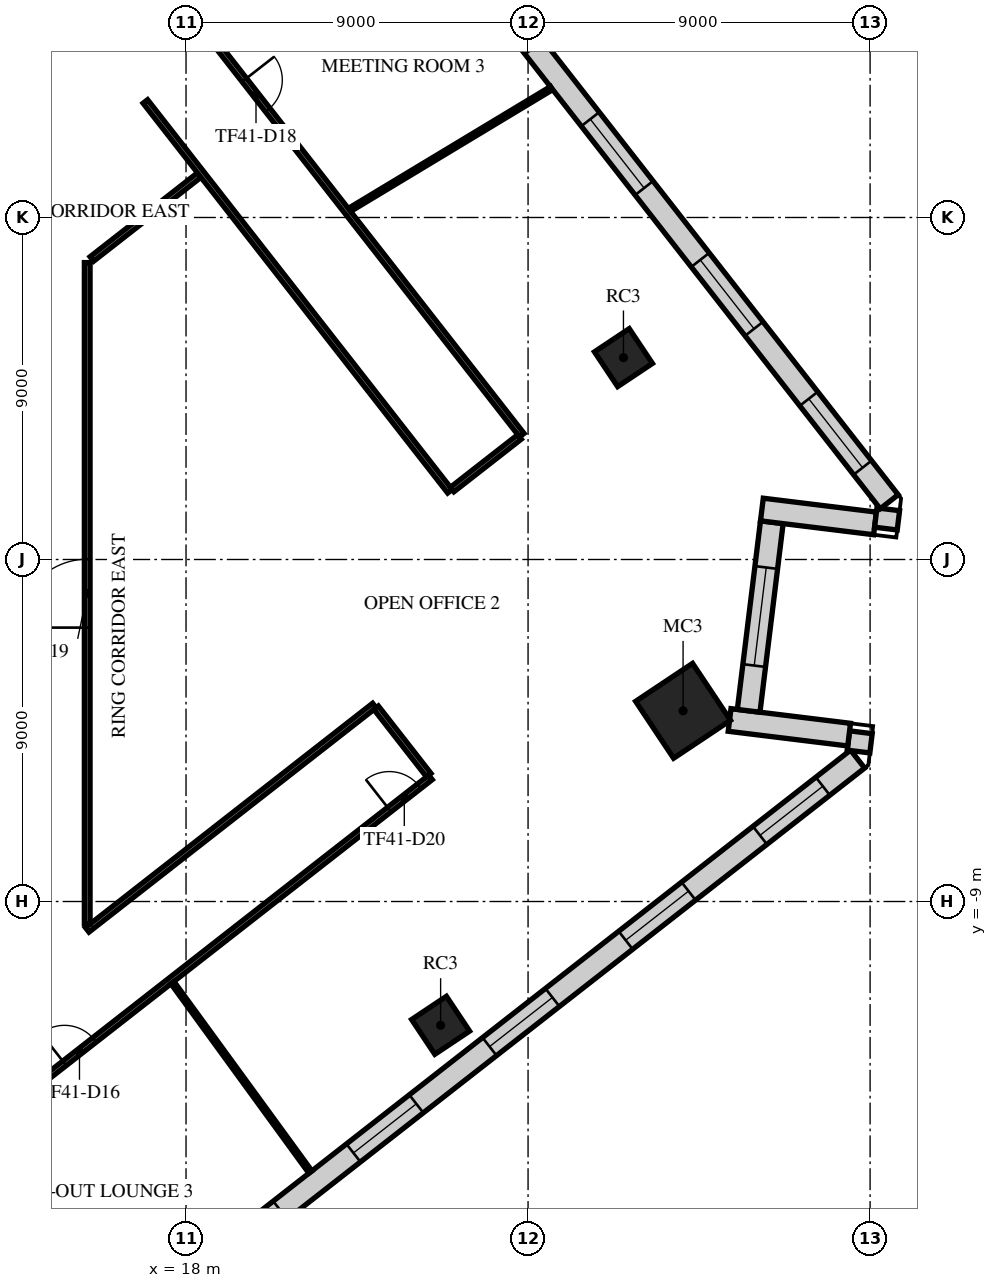
"""IFC4 building model, lengths in metres.
Left out: names, types, materials, properties, quantities, classifications, styles, units other than length and angle.
Written with IfcOpenShell. Run it as: python <this file> out.ifc"""

import sys

from ifc_helpers import new_model, si_unit, direction, frame, frame_2d, origin, origin_2d, place, context, subcontext, project, spatial, rectangle, extrude, element, fill, save


model = new_model("IFC4")
c1 = context("Model", 3, precision=1e-05, world=origin(), true_north=direction((0.0, 1.0)))
c2 = subcontext(c1, "Body", "Model", "MODEL_VIEW")
j1 = project(units=[si_unit("LENGTHUNIT", "METRE"), si_unit("PLANEANGLEUNIT", "RADIAN")], contexts=[c1])
p1 = place(None, origin())
s1 = spatial("IfcSite", under=j1, at=p1, CompositionType="ELEMENT")
p2 = place(p1, origin())
s2 = spatial("IfcBuilding", under=s1, at=p2, CompositionType="ELEMENT")
p3 = place(p2, frame((0.0, 0.0, 175.7)))
s3 = spatial("IfcBuildingStorey", under=s2, at=p3, CompositionType="ELEMENT", Elevation=175.7)
p4 = place(p3, frame((24.699, -12.258, 0.0), z_axis=(0.0, 0.0, 1.0), x_axis=(0.832028680356, 0.55473261583, 0.0)))
e1 = element("IfcColumn", 1, at=p4, inside=s3, PredefinedType="COLUMN", context=c2, shape_type="SweptSolid", body=[
    extrude(rectangle(XDim=1.1, YDim=1.1, at=origin_2d()), origin(), (0.0, 0.0, 1.0), 4.0),
])
p5 = place(p3, frame((31.079, -3.982, 0.0), z_axis=(0.0, 0.0, 1.0), x_axis=(0.832028680356, 0.55473261583, 0.0)))
e2 = element("IfcColumn", 2, at=p5, inside=s3, PredefinedType="COLUMN", context=c2, shape_type="SweptSolid", body=[
    extrude(rectangle(XDim=1.8, YDim=1.8, at=origin_2d()), origin(), (0.0, 0.0, 1.0), 4.0),
])
p6 = place(p3, frame((29.51, 5.312, 0.0), z_axis=(0.0, 0.0, 1.0), x_axis=(0.832028680356, 0.55473261583, 0.0)))
e3 = element("IfcColumn", 3, at=p6, inside=s3, PredefinedType="COLUMN", context=c2, shape_type="SweptSolid", body=[
    extrude(rectangle(XDim=1.1, YDim=1.1, at=origin_2d()), origin(), (0.0, 0.0, 1.0), 4.0),
])
p7 = place(p3, frame((-3.534, -35.882, 0.0), z_axis=(0.0, 0.0, 1.0), x_axis=(0.788011205374, 0.61566089709, 0.0)))
e4 = element("IfcWall", 4, at=p7, inside=s3, PredefinedType="STANDARD", context=c2, shape_type="SweptSolid", body=[
    extrude(rectangle(XDim=49.752, YDim=0.6, at=frame_2d((24.876, 0.0))), origin(), (0.0, 0.0, 1.0), 3.6),
])
p8 = place(p7, frame((1.161, 0.0, 0.9)))
e5 = element("IfcOpeningElement", 5, at=p8, cuts=e4, PredefinedType="OPENING", context=c2, shape_type="SweptSolid", body=[
    extrude(rectangle(XDim=2.1, YDim=2.1, at=frame_2d((1.05, 1.05))), frame((0.0, 0.31, 0.0), z_axis=(0.0, -1.0, 0.0), x_axis=(1.0, 0.0, 0.0)), (0.0, 0.0, 1.0), 0.62),
])
p9 = place(p7, frame((5.644, 0.0, 0.9)))
e6 = element("IfcOpeningElement", 6, at=p9, cuts=e4, PredefinedType="OPENING", context=c2, shape_type="SweptSolid", body=[
    extrude(rectangle(XDim=2.1, YDim=2.1, at=frame_2d((1.05, 1.05))), frame((0.0, 0.31, 0.0), z_axis=(0.0, -1.0, 0.0), x_axis=(1.0, 0.0, 0.0)), (0.0, 0.0, 1.0), 0.62),
])
p10 = place(p7, frame((10.189, 0.0, 0.9)))
e7 = element("IfcOpeningElement", 7, at=p10, cuts=e4, PredefinedType="OPENING", context=c2, shape_type="SweptSolid", body=[
    extrude(rectangle(XDim=2.1, YDim=2.1, at=frame_2d((1.05, 1.05))), frame((0.0, 0.31, 0.0), z_axis=(0.0, -1.0, 0.0), x_axis=(1.0, 0.0, 0.0)), (0.0, 0.0, 1.0), 0.62),
])
p11 = place(p7, frame((14.735, 0.0, 0.9)))
e8 = element("IfcOpeningElement", 8, at=p11, cuts=e4, PredefinedType="OPENING", context=c2, shape_type="SweptSolid", body=[
    extrude(rectangle(XDim=2.1, YDim=2.1, at=frame_2d((1.05, 1.05))), frame((0.0, 0.31, 0.0), z_axis=(0.0, -1.0, 0.0), x_axis=(1.0, 0.0, 0.0)), (0.0, 0.0, 1.0), 0.62),
])
p12 = place(p7, frame((19.28, 0.0, 0.9)))
e9 = element("IfcOpeningElement", 9, at=p12, cuts=e4, PredefinedType="OPENING", context=c2, shape_type="SweptSolid", body=[
    extrude(rectangle(XDim=2.1, YDim=2.1, at=frame_2d((1.05, 1.05))), frame((0.0, 0.31, 0.0), z_axis=(0.0, -1.0, 0.0), x_axis=(1.0, 0.0, 0.0)), (0.0, 0.0, 1.0), 0.62),
])
p13 = place(p7, frame((23.826, 0.0, 0.9)))
e10 = element("IfcOpeningElement", 10, at=p13, cuts=e4, PredefinedType="OPENING", context=c2, shape_type="SweptSolid", body=[
    extrude(rectangle(XDim=2.1, YDim=2.1, at=frame_2d((1.05, 1.05))), frame((0.0, 0.31, 0.0), z_axis=(0.0, -1.0, 0.0), x_axis=(1.0, 0.0, 0.0)), (0.0, 0.0, 1.0), 0.62),
])
p14 = place(p7, frame((28.371, 0.0, 0.9)))
e11 = element("IfcOpeningElement", 11, at=p14, cuts=e4, PredefinedType="OPENING", context=c2, shape_type="SweptSolid", body=[
    extrude(rectangle(XDim=2.1, YDim=2.1, at=frame_2d((1.05, 1.05))), frame((0.0, 0.31, 0.0), z_axis=(0.0, -1.0, 0.0), x_axis=(1.0, 0.0, 0.0)), (0.0, 0.0, 1.0), 0.62),
])
p15 = place(p7, frame((32.917, 0.0, 0.9)))
e12 = element("IfcOpeningElement", 12, at=p15, cuts=e4, PredefinedType="OPENING", context=c2, shape_type="SweptSolid", body=[
    extrude(rectangle(XDim=2.1, YDim=2.1, at=frame_2d((1.05, 1.05))), frame((0.0, 0.31, 0.0), z_axis=(0.0, -1.0, 0.0), x_axis=(1.0, 0.0, 0.0)), (0.0, 0.0, 1.0), 0.62),
])
p16 = place(p7, frame((37.462, 0.0, 0.9)))
e13 = element("IfcOpeningElement", 13, at=p16, cuts=e4, PredefinedType="OPENING", context=c2, shape_type="SweptSolid", body=[
    extrude(rectangle(XDim=2.1, YDim=2.1, at=frame_2d((1.05, 1.05))), frame((0.0, 0.31, 0.0), z_axis=(0.0, -1.0, 0.0), x_axis=(1.0, 0.0, 0.0)), (0.0, 0.0, 1.0), 0.62),
])
p17 = place(p7, frame((42.008, 0.0, 0.9)))
e14 = element("IfcOpeningElement", 14, at=p17, cuts=e4, PredefinedType="OPENING", context=c2, shape_type="SweptSolid", body=[
    extrude(rectangle(XDim=2.1, YDim=2.1, at=frame_2d((1.05, 1.05))), frame((0.0, 0.31, 0.0), z_axis=(0.0, -1.0, 0.0), x_axis=(1.0, 0.0, 0.0)), (0.0, 0.0, 1.0), 0.62),
])
p18 = place(p7, frame((46.491, 0.0, 0.9)))
e15 = element("IfcOpeningElement", 15, at=p18, cuts=e4, PredefinedType="OPENING", context=c2, shape_type="SweptSolid", body=[
    extrude(rectangle(XDim=2.1, YDim=2.1, at=frame_2d((1.05, 1.05))), frame((0.0, 0.31, 0.0), z_axis=(0.0, -1.0, 0.0), x_axis=(1.0, 0.0, 0.0)), (0.0, 0.0, 1.0), 0.62),
])
p19 = place(p3, frame((35.696, -5.053, 0.0), z_axis=(0.0, 0.0, 1.0), x_axis=(0.121800492671, 0.992554603024, 0.0)))
e16 = element("IfcWall", 16, at=p19, inside=s3, PredefinedType="STANDARD", context=c2, shape_type="SweptSolid", body=[
    extrude(rectangle(XDim=0.511, YDim=0.6, at=frame_2d((0.256, 0.0))), origin(), (0.0, 0.0, 1.0), 3.6),
])
p20 = place(p3, frame((35.448, -4.609, 0.0), z_axis=(0.0, 0.0, 1.0), x_axis=(-0.992542310393, 0.12190062379, 0.0)))
e17 = element("IfcWall", 17, at=p20, inside=s3, PredefinedType="STANDARD", context=c2, shape_type="SweptSolid", body=[
    extrude(rectangle(XDim=3.168, YDim=0.6, at=frame_2d((1.584, 0.0))), origin(), (0.0, 0.0, 1.0), 3.6),
])
p21 = place(p3, frame((32.804, -3.982, 0.0), z_axis=(0.0, 0.0, 1.0), x_axis=(0.121876954874, 0.992545217041, 0.0)))
e18 = element("IfcWall", 18, at=p21, inside=s3, PredefinedType="STANDARD", context=c2, shape_type="SweptSolid", body=[
    extrude(rectangle(XDim=5.0, YDim=0.6, at=frame_2d((2.5, 0.0))), origin(), (0.0, 0.0, 1.0), 3.6),
])
p22 = place(p21, frame((1.2, 0.0, 0.9)))
e19 = element("IfcOpeningElement", 19, at=p22, cuts=e18, PredefinedType="OPENING", context=c2, shape_type="SweptSolid", body=[
    extrude(rectangle(XDim=2.6, YDim=2.1, at=frame_2d((1.3, 1.05))), frame((0.0, 0.31, 0.0), z_axis=(0.0, -1.0, 0.0), x_axis=(1.0, 0.0, 0.0)), (0.0, 0.0, 1.0), 0.62),
])
p23 = place(p3, frame((33.153, 1.315, 0.0), z_axis=(0.0, 0.0, 1.0), x_axis=(0.992542246186, -0.121901146576, 0.0)))
e20 = element("IfcWall", 20, at=p23, inside=s3, PredefinedType="STANDARD", context=c2, shape_type="SweptSolid", body=[
    extrude(rectangle(XDim=3.0, YDim=0.6, at=frame_2d((1.5, 0.0))), origin(), (0.0, 0.0, 1.0), 3.6),
])
p24 = place(p3, frame((36.416, 0.814, 0.0), z_axis=(0.0, 0.0, 1.0), x_axis=(0.121800492671, 0.992554603024, 0.0)))
e21 = element("IfcWall", 21, at=p24, inside=s3, PredefinedType="STANDARD", context=c2, shape_type="SweptSolid", body=[
    extrude(rectangle(XDim=0.511, YDim=0.6, at=frame_2d((0.256, 0.0))), origin(), (0.0, 0.0, 1.0), 3.6),
])
p25 = place(p3, frame((36.503, 1.52, 0.0), z_axis=(0.0, 0.0, 1.0), x_axis=(-0.615660779349, 0.788011297363, 0.0)))
e22 = element("IfcWall", 22, at=p25, inside=s3, PredefinedType="STANDARD", context=c2, shape_type="SweptSolid", body=[
    extrude(rectangle(XDim=42.176, YDim=0.6, at=frame_2d((21.088, 0.0))), origin(), (0.0, 0.0, 1.0), 3.6),
])
p26 = place(p25, frame((1.138, 0.0, 0.9)))
e23 = element("IfcOpeningElement", 23, at=p26, cuts=e22, PredefinedType="OPENING", context=c2, shape_type="SweptSolid", body=[
    extrude(rectangle(XDim=2.3, YDim=2.1, at=frame_2d((1.15, 1.05))), frame((0.0, 0.31, 0.0), z_axis=(0.0, -1.0, 0.0), x_axis=(1.0, 0.0, 0.0)), (0.0, 0.0, 1.0), 0.62),
])
p27 = place(p25, frame((5.776, 0.0, 0.9)))
e24 = element("IfcOpeningElement", 24, at=p27, cuts=e22, PredefinedType="OPENING", context=c2, shape_type="SweptSolid", body=[
    extrude(rectangle(XDim=2.3, YDim=2.1, at=frame_2d((1.15, 1.05))), frame((0.0, 0.31, 0.0), z_axis=(0.0, -1.0, 0.0), x_axis=(1.0, 0.0, 0.0)), (0.0, 0.0, 1.0), 0.62),
])
p28 = place(p25, frame((10.476, 0.0, 0.9)))
e25 = element("IfcOpeningElement", 25, at=p28, cuts=e22, PredefinedType="OPENING", context=c2, shape_type="SweptSolid", body=[
    extrude(rectangle(XDim=2.3, YDim=2.1, at=frame_2d((1.15, 1.05))), frame((0.0, 0.31, 0.0), z_axis=(0.0, -1.0, 0.0), x_axis=(1.0, 0.0, 0.0)), (0.0, 0.0, 1.0), 0.62),
])
p29 = place(p25, frame((15.176, 0.0, 0.9)))
e26 = element("IfcOpeningElement", 26, at=p29, cuts=e22, PredefinedType="OPENING", context=c2, shape_type="SweptSolid", body=[
    extrude(rectangle(XDim=2.3, YDim=2.1, at=frame_2d((1.15, 1.05))), frame((0.0, 0.31, 0.0), z_axis=(0.0, -1.0, 0.0), x_axis=(1.0, 0.0, 0.0)), (0.0, 0.0, 1.0), 0.62),
])
p30 = place(p25, frame((19.876, 0.0, 0.9)))
e27 = element("IfcOpeningElement", 27, at=p30, cuts=e22, PredefinedType="OPENING", context=c2, shape_type="SweptSolid", body=[
    extrude(rectangle(XDim=2.3, YDim=2.1, at=frame_2d((1.15, 1.05))), frame((0.0, 0.31, 0.0), z_axis=(0.0, -1.0, 0.0), x_axis=(1.0, 0.0, 0.0)), (0.0, 0.0, 1.0), 0.62),
])
p31 = place(p25, frame((24.576, 0.0, 0.9)))
e28 = element("IfcOpeningElement", 28, at=p31, cuts=e22, PredefinedType="OPENING", context=c2, shape_type="SweptSolid", body=[
    extrude(rectangle(XDim=2.3, YDim=2.1, at=frame_2d((1.15, 1.05))), frame((0.0, 0.31, 0.0), z_axis=(0.0, -1.0, 0.0), x_axis=(1.0, 0.0, 0.0)), (0.0, 0.0, 1.0), 0.62),
])
p32 = place(p25, frame((33.976, 0.0, 0.9)))
e29 = element("IfcOpeningElement", 29, at=p32, cuts=e22, PredefinedType="OPENING", context=c2, shape_type="SweptSolid", body=[
    extrude(rectangle(XDim=2.3, YDim=2.1, at=frame_2d((1.15, 1.05))), frame((0.0, 0.31, 0.0), z_axis=(0.0, -1.0, 0.0), x_axis=(1.0, 0.0, 0.0)), (0.0, 0.0, 1.0), 0.62),
])
p33 = place(p25, frame((38.676, 0.0, 0.9)))
e30 = element("IfcOpeningElement", 30, at=p33, cuts=e22, PredefinedType="OPENING", context=c2, shape_type="SweptSolid", body=[
    extrude(rectangle(XDim=2.3, YDim=2.1, at=frame_2d((1.15, 1.05))), frame((0.0, 0.31, 0.0), z_axis=(0.0, -1.0, 0.0), x_axis=(1.0, 0.0, 0.0)), (0.0, 0.0, 1.0), 0.62),
])
p34 = place(p3, frame((-0.348, -25.095, 0.0), z_axis=(0.0, 0.0, 1.0), x_axis=(0.788010131951, 0.615662271008, 0.0)))
e31 = element("IfcWall", 31, at=p34, inside=s3, PredefinedType="PARTITIONING", context=c2, shape_type="SweptSolid", body=[
    extrude(rectangle(XDim=31.448, YDim=0.15, at=frame_2d((15.724, 0.0))), origin(), (0.0, 0.0, 1.0), 3.15),
])
p35 = place(p34, frame((4.801, 0.0, 0.0)))
e32 = element("IfcOpeningElement", 32, at=p35, cuts=e31, PredefinedType="OPENING", context=c2, shape_type="SweptSolid", body=[
    extrude(rectangle(XDim=1.8, YDim=2.1, at=frame_2d((0.9, 1.05))), frame((0.0, 0.085, 0.0), z_axis=(0.0, -1.0, 0.0), x_axis=(1.0, 0.0, 0.0)), (0.0, 0.0, 1.0), 0.17),
])
p36 = place(p34, frame((0.301, 0.0, 0.0)))
e33 = element("IfcOpeningElement", 33, at=p36, cuts=e31, PredefinedType="OPENING", context=c2, shape_type="SweptSolid", body=[
    extrude(rectangle(XDim=1.0, YDim=2.1, at=frame_2d((0.5, 1.05))), frame((0.0, 0.085, 0.0), z_axis=(0.0, -1.0, 0.0), x_axis=(1.0, 0.0, 0.0)), (0.0, 0.0, 1.0), 0.17),
])
p37 = place(p34, frame((19.226, 0.0, 0.0)))
e34 = element("IfcOpeningElement", 34, at=p37, cuts=e31, PredefinedType="OPENING", context=c2, shape_type="SweptSolid", body=[
    extrude(rectangle(XDim=1.0, YDim=2.1, at=frame_2d((0.5, 1.05))), frame((0.0, 0.085, 0.0), z_axis=(0.0, -1.0, 0.0), x_axis=(1.0, 0.0, 0.0)), (0.0, 0.0, 1.0), 0.17),
])
p38 = place(p34, frame((30.072, 0.0, 0.0)))
e35 = element("IfcOpeningElement", 35, at=p38, cuts=e31, PredefinedType="OPENING", context=c2, shape_type="SweptSolid", body=[
    extrude(rectangle(XDim=1.0, YDim=2.1, at=frame_2d((0.5, 1.05))), frame((0.0, 0.085, 0.0), z_axis=(0.0, -1.0, 0.0), x_axis=(1.0, 0.0, 0.0)), (0.0, 0.0, 1.0), 0.17),
])
p39 = place(p3, frame((9.713, 25.187, 0.0), z_axis=(0.0, 0.0, 1.0), x_axis=(0.615659714696, -0.788012129158, 0.0)))
e36 = element("IfcWall", 36, at=p39, inside=s3, PredefinedType="PARTITIONING", context=c2, shape_type="SweptSolid", body=[
    extrude(rectangle(XDim=27.811, YDim=0.15, at=frame_2d((13.905, 0.0))), origin(), (0.0, 0.0, 1.0), 3.15),
])
p40 = place(p39, frame((8.299, 0.0, 0.0)))
e37 = element("IfcOpeningElement", 37, at=p40, cuts=e36, PredefinedType="OPENING", context=c2, shape_type="SweptSolid", body=[
    extrude(rectangle(XDim=1.0, YDim=2.1, at=frame_2d((0.5, 1.05))), frame((0.0, 0.085, 0.0), z_axis=(0.0, -1.0, 0.0), x_axis=(1.0, 0.0, 0.0)), (0.0, 0.0, 1.0), 0.17),
])
p41 = place(p39, frame((15.951, 0.0, 0.0)))
e38 = element("IfcOpeningElement", 38, at=p41, cuts=e36, PredefinedType="OPENING", context=c2, shape_type="SweptSolid", body=[
    extrude(rectangle(XDim=1.0, YDim=2.1, at=frame_2d((0.5, 1.05))), frame((0.0, 0.085, 0.0), z_axis=(0.0, -1.0, 0.0), x_axis=(1.0, 0.0, 0.0)), (0.0, 0.0, 1.0), 0.17),
])
p42 = place(p3, frame((15.4, -9.746, 0.0), z_axis=(0.0, 0.0, 1.0), x_axis=(0.787983457068, 0.615696411705, 0.0)))
e39 = element("IfcWall", 39, at=p42, inside=s3, PredefinedType="PARTITIONING", context=c2, shape_type="SweptSolid", body=[
    extrude(rectangle(XDim=9.589, YDim=0.15, at=frame_2d((4.794, 0.0))), origin(), (0.0, 0.0, 1.0), 3.15),
])
p43 = place(p3, frame((15.4, -9.592, 0.0), z_axis=(0.0, 0.0, 1.0), x_axis=(0.0, 1.0, 0.0)))
e40 = element("IfcWall", 40, at=p43, inside=s3, PredefinedType="PARTITIONING", context=c2, shape_type="SweptSolid", body=[
    extrude(rectangle(XDim=17.405, YDim=0.15, at=frame_2d((8.703, 0.0))), origin(), (0.0, 0.0, 1.0), 3.15),
])
p44 = place(p43, frame((7.8, 0.0, 0.0)))
e41 = element("IfcOpeningElement", 41, at=p44, cuts=e40, PredefinedType="OPENING", context=c2, shape_type="SweptSolid", body=[
    extrude(rectangle(XDim=1.8, YDim=2.1, at=frame_2d((0.9, 1.05))), frame((0.0, 0.085, 0.0), z_axis=(0.0, -1.0, 0.0), x_axis=(1.0, 0.0, 0.0)), (0.0, 0.0, 1.0), 0.17),
])
p45 = place(p3, frame((15.521, 7.908, 0.0), z_axis=(0.0, 0.0, 1.0), x_axis=(0.787935399888, 0.615757911524, 0.0)))
e42 = element("IfcWall", 42, at=p45, inside=s3, PredefinedType="PARTITIONING", context=c2, shape_type="SweptSolid", body=[
    extrude(rectangle(XDim=3.661, YDim=0.15, at=frame_2d((1.831, 0.0))), origin(), (0.0, 0.0, 1.0), 3.15),
])
p46 = place(p3, frame((16.929, 12.053, 0.0), z_axis=(0.0, 0.0, 1.0), x_axis=(0.615693171882, -0.787985988516, 0.0)))
e43 = element("IfcWall", 43, at=p46, inside=s3, PredefinedType="PARTITIONING", context=c2, shape_type="SweptSolid", body=[
    extrude(rectangle(XDim=13.018, YDim=0.15, at=frame_2d((6.509, 0.0))), origin(), (0.0, 0.0, 1.0), 3.15),
])
p47 = place(p3, frame((23.002, -3.901, 0.0), z_axis=(0.0, 0.0, 1.0), x_axis=(0.615321836597, -0.788275990632, 0.0)))
e44 = element("IfcWall", 44, at=p47, inside=s3, PredefinedType="PARTITIONING", context=c2, shape_type="SweptSolid", body=[
    extrude(rectangle(XDim=2.25, YDim=0.15, at=frame_2d((1.125, 0.0))), origin(), (0.0, 0.0, 1.0), 3.15),
])
p48 = place(p3, frame((25.003, 1.841, 0.0), z_axis=(0.0, 0.0, 1.0), x_axis=(0.788111579875, 0.6155324018, 0.0)))
e45 = element("IfcWall", 45, at=p48, inside=s3, PredefinedType="PARTITIONING", context=c2, shape_type="SweptSolid", body=[
    extrude(rectangle(XDim=2.249, YDim=0.15, at=frame_2d((1.125, 0.0))), origin(), (0.0, 0.0, 1.0), 3.6),
])
p49 = place(p3, frame((17.643, -11.136, 0.0), z_axis=(0.0, 0.0, 1.0), x_axis=(0.588621430422, -0.808408814677, 0.0)))
e46 = element("IfcWall", 46, at=p49, inside=s3, PredefinedType="PARTITIONING", context=c2, shape_type="SweptSolid", body=[
    extrude(rectangle(XDim=6.164, YDim=0.1, at=frame_2d((3.082, 0.0))), origin(), (0.0, 0.0, 1.0), 2.9),
])
p50 = place(p3, frame((22.305, 9.202, 0.0), z_axis=(0.0, 0.0, 1.0), x_axis=(0.856511778294, 0.516127478095, 0.0)))
e47 = element("IfcWall", 47, at=p50, inside=s3, PredefinedType="PARTITIONING", context=c2, shape_type="SweptSolid", body=[
    extrude(rectangle(XDim=6.201, YDim=0.1, at=frame_2d((3.101, 0.0))), origin(), (0.0, 0.0, 1.0), 2.9),
])
p51 = place(p15, origin())
e48 = element("IfcWindow", 48, at=p51, inside=s3, PartitioningType="SINGLE_PANEL", PredefinedType="WINDOW", context=c2, shape_type="SweptSolid", body=[
    extrude(rectangle(XDim=2.1, YDim=2.1, at=frame_2d((1.05, 1.05))), frame((0.0, 0.03, 0.0), z_axis=(0.0, -1.0, 0.0), x_axis=(1.0, 0.0, 0.0)), (0.0, 0.0, 1.0), 0.06),
])
fill(e12, e48)
p52 = place(p16, origin())
e49 = element("IfcWindow", 49, at=p52, inside=s3, PartitioningType="SINGLE_PANEL", PredefinedType="WINDOW", context=c2, shape_type="SweptSolid", body=[
    extrude(rectangle(XDim=2.1, YDim=2.1, at=frame_2d((1.05, 1.05))), frame((0.0, 0.03, 0.0), z_axis=(0.0, -1.0, 0.0), x_axis=(1.0, 0.0, 0.0)), (0.0, 0.0, 1.0), 0.06),
])
fill(e13, e49)
p53 = place(p17, origin())
e50 = element("IfcWindow", 50, at=p53, inside=s3, PartitioningType="SINGLE_PANEL", PredefinedType="WINDOW", context=c2, shape_type="SweptSolid", body=[
    extrude(rectangle(XDim=2.1, YDim=2.1, at=frame_2d((1.05, 1.05))), frame((0.0, 0.03, 0.0), z_axis=(0.0, -1.0, 0.0), x_axis=(1.0, 0.0, 0.0)), (0.0, 0.0, 1.0), 0.06),
])
fill(e14, e50)
p54 = place(p18, origin())
e51 = element("IfcWindow", 51, at=p54, inside=s3, PartitioningType="SINGLE_PANEL", PredefinedType="WINDOW", context=c2, shape_type="SweptSolid", body=[
    extrude(rectangle(XDim=2.1, YDim=2.1, at=frame_2d((1.05, 1.05))), frame((0.0, 0.03, 0.0), z_axis=(0.0, -1.0, 0.0), x_axis=(1.0, 0.0, 0.0)), (0.0, 0.0, 1.0), 0.06),
])
fill(e15, e51)
p55 = place(p22, origin())
e52 = element("IfcWindow", 52, at=p55, inside=s3, PartitioningType="SINGLE_PANEL", PredefinedType="WINDOW", context=c2, shape_type="SweptSolid", body=[
    extrude(rectangle(XDim=2.6, YDim=2.1, at=frame_2d((1.3, 1.05))), frame((0.0, 0.03, 0.0), z_axis=(0.0, -1.0, 0.0), x_axis=(1.0, 0.0, 0.0)), (0.0, 0.0, 1.0), 0.06),
])
fill(e19, e52)
p56 = place(p26, origin())
e53 = element("IfcWindow", 53, at=p56, inside=s3, PartitioningType="SINGLE_PANEL", PredefinedType="WINDOW", context=c2, shape_type="SweptSolid", body=[
    extrude(rectangle(XDim=2.3, YDim=2.1, at=frame_2d((1.15, 1.05))), frame((0.0, 0.03, 0.0), z_axis=(0.0, -1.0, 0.0), x_axis=(1.0, 0.0, 0.0)), (0.0, 0.0, 1.0), 0.06),
])
fill(e23, e53)
p57 = place(p27, origin())
e54 = element("IfcWindow", 54, at=p57, inside=s3, PartitioningType="SINGLE_PANEL", PredefinedType="WINDOW", context=c2, shape_type="SweptSolid", body=[
    extrude(rectangle(XDim=2.3, YDim=2.1, at=frame_2d((1.15, 1.05))), frame((0.0, 0.03, 0.0), z_axis=(0.0, -1.0, 0.0), x_axis=(1.0, 0.0, 0.0)), (0.0, 0.0, 1.0), 0.06),
])
fill(e24, e54)
p58 = place(p28, origin())
e55 = element("IfcWindow", 55, at=p58, inside=s3, PartitioningType="SINGLE_PANEL", PredefinedType="WINDOW", context=c2, shape_type="SweptSolid", body=[
    extrude(rectangle(XDim=2.3, YDim=2.1, at=frame_2d((1.15, 1.05))), frame((0.0, 0.03, 0.0), z_axis=(0.0, -1.0, 0.0), x_axis=(1.0, 0.0, 0.0)), (0.0, 0.0, 1.0), 0.06),
])
fill(e25, e55)
p59 = place(p37, frame((1.0, 0.0, 0.0), z_axis=(0.0, 0.0, 1.0), x_axis=(-1.0, 0.0, 0.0)))
e56 = element("IfcDoor", 56, at=p59, inside=s3, OperationType="SINGLE_SWING_RIGHT", PredefinedType="DOOR", context=c2, shape_type="SweptSolid", body=[
    extrude(rectangle(XDim=1.0, YDim=2.1, at=frame_2d((0.5, 1.05))), frame((0.0, 0.025, 0.0), z_axis=(0.0, -1.0, 0.0), x_axis=(1.0, 0.0, 0.0)), (0.0, 0.0, 1.0), 0.05),
])
fill(e34, e56)
p60 = place(p41, origin())
e57 = element("IfcDoor", 57, at=p60, inside=s3, OperationType="SINGLE_SWING_LEFT", PredefinedType="DOOR", context=c2, shape_type="SweptSolid", body=[
    extrude(rectangle(XDim=1.0, YDim=2.1, at=frame_2d((0.5, 1.05))), frame((0.0, 0.025, 0.0), z_axis=(0.0, -1.0, 0.0), x_axis=(1.0, 0.0, 0.0)), (0.0, 0.0, 1.0), 0.05),
])
fill(e38, e57)
p61 = place(p44, frame((1.8, 0.0, 0.0), z_axis=(0.0, 0.0, 1.0), x_axis=(-1.0, 0.0, 0.0)))
e58 = element("IfcDoor", 58, at=p61, inside=s3, OperationType="DOUBLE_DOOR_SINGLE_SWING", PredefinedType="DOOR", context=c2, shape_type="SweptSolid", body=[
    extrude(rectangle(XDim=1.8, YDim=2.1, at=frame_2d((0.9, 1.05))), frame((0.0, 0.025, 0.0), z_axis=(0.0, -1.0, 0.0), x_axis=(1.0, 0.0, 0.0)), (0.0, 0.0, 1.0), 0.05),
])
fill(e41, e58)
p62 = place(p38, frame((1.0, 0.0, 0.0), z_axis=(0.0, 0.0, 1.0), x_axis=(-1.0, 0.0, 0.0)))
e59 = element("IfcDoor", 59, at=p62, inside=s3, OperationType="SINGLE_SWING_RIGHT", PredefinedType="DOOR", context=c2, shape_type="SweptSolid", body=[
    extrude(rectangle(XDim=1.0, YDim=2.1, at=frame_2d((0.5, 1.05))), frame((0.0, 0.025, 0.0), z_axis=(0.0, -1.0, 0.0), x_axis=(1.0, 0.0, 0.0)), (0.0, 0.0, 1.0), 0.05),
])
fill(e35, e59)
save(model, sys.argv[1])
